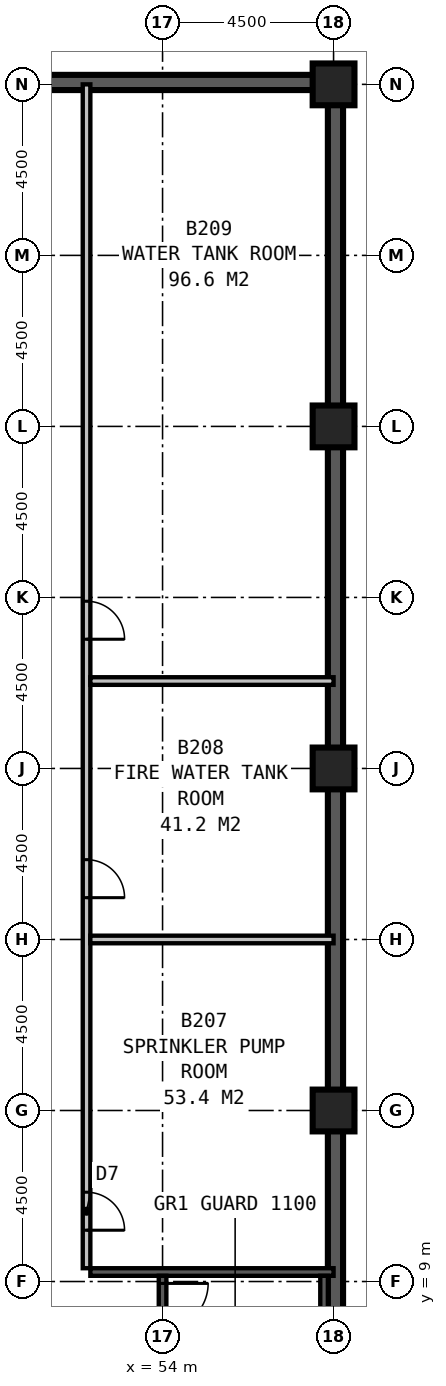
"""IFC4 building model, lengths in metres.
Left out: names, types, materials, properties, quantities, classifications, styles, units other than length and angle.
Written with IfcOpenShell. Run it as: python <this file> out.ifc"""

import sys

from ifc_helpers import new_model, si_unit, direction, frame, frame_2d, origin, origin_2d, place, context, subcontext, project, spatial, rectangle, extrude, element, fill, save


model = new_model("IFC4")
c1 = context("Model", 3, precision=1e-05, world=origin(), true_north=direction((0.0, 1.0)))
c2 = subcontext(c1, "Body", "Model", "MODEL_VIEW")
j1 = project(units=[si_unit("LENGTHUNIT", "METRE"), si_unit("PLANEANGLEUNIT", "RADIAN")], contexts=[c1])
p1 = place(None, origin())
s1 = spatial("IfcSite", under=j1, at=p1, CompositionType="ELEMENT")
p2 = place(p1, origin())
s2 = spatial("IfcBuilding", under=s1, at=p2, CompositionType="ELEMENT")
p3 = place(p2, frame((0.0, 0.0, -9.0)))
s3 = spatial("IfcBuildingStorey", under=s2, at=p3, CompositionType="ELEMENT", Elevation=-9.0)
for number, where, z_axis, x_axis in (
    (1, (58.5, 13.5, -0.6), (0.0, 0.0, 1.0), (1.0, 0.0, 0.0)),
    (2, (58.5, 22.5, -0.6), (0.0, 0.0, 1.0), (1.0, 0.0, 0.0)),
    (3, (58.5, 31.5, -0.6), (0.0, 0.0, 1.0), (1.0, 0.0, 0.0)),
    (4, (58.5, 40.5, -0.6), (0.0, 0.0, 1.0), (1.0, 0.0, 0.0)),
):
    element("IfcColumn", number, at=place(p3, frame(where, z_axis=z_axis, x_axis=x_axis)), inside=s3, PredefinedType="COLUMN", context=c2, shape_type="SweptSolid", body=[
        extrude(rectangle(XDim=1.1, YDim=1.1, at=origin_2d()), origin(), (0.0, 0.0, 1.0), 5.1),
    ])
p4 = place(p3, frame((58.55, -13.35, -0.6), z_axis=(0.0, 0.0, 1.0), x_axis=(0.0, 1.0, 0.0)))
e5 = element("IfcWall", 5, at=p4, inside=s3, PredefinedType="SOLIDWALL", context=c2, shape_type="SweptSolid", body=[
    extrude(rectangle(XDim=53.7, YDim=0.4, at=frame_2d((26.85, 0.0))), origin(), (0.0, 0.0, 1.0), 5.1),
])
p5 = place(p3, frame((58.75, 40.55, -0.6), z_axis=(0.0, 0.0, 1.0), x_axis=(-1.0, 0.0, 0.0)))
e6 = element("IfcWall", 6, at=p5, inside=s3, PredefinedType="SOLIDWALL", context=c2, shape_type="SweptSolid", body=[
    extrude(rectangle(XDim=77.0, YDim=0.4, at=frame_2d((38.5, 0.0))), origin(), (0.0, 0.0, 1.0), 5.1),
])
p6 = place(p3, frame((54.0, 1.1, 0.0), z_axis=(0.0, 0.0, 1.0), x_axis=(0.0, 1.0, 0.0)))
e7 = element("IfcWall", 7, at=p6, inside=s3, PredefinedType="SOLIDWALL", context=c2, shape_type="SweptSolid", body=[
    extrude(rectangle(XDim=8.05, YDim=0.2, at=frame_2d((4.025, 0.0))), origin(), (0.0, 0.0, 1.0), 4.25),
])
p7 = place(p6, frame((7.85, 0.0, 0.0), z_axis=(0.0, 0.0, 1.0), x_axis=(-1.0, 0.0, 0.0)))
e8 = element("IfcOpeningElement", 8, at=p7, cuts=e7, PredefinedType="OPENING", context=c2, shape_type="SweptSolid", body=[
    extrude(rectangle(XDim=1.2, YDim=2.1, at=frame_2d((0.6, 1.05))), frame((0.0, 0.11, 0.0), z_axis=(0.0, -1.0, 0.0), x_axis=(1.0, 0.0, 0.0)), (0.0, 0.0, 1.0), 0.22),
])
p8 = place(p3, frame((52.1, 9.25, 0.0), z_axis=(0.0, 0.0, 1.0), x_axis=(1.0, 0.0, 0.0)))
e9 = element("IfcWall", 9, at=p8, inside=s3, PredefinedType="SOLIDWALL", context=c2, shape_type="SweptSolid", body=[
    extrude(rectangle(XDim=6.4, YDim=0.2, at=frame_2d((3.2, 0.0))), origin(), (0.0, 0.0, 1.0), 4.25),
])
p9 = place(p3, frame((58.25, 5.05, 0.0), z_axis=(0.0, 0.0, 1.0), x_axis=(0.0, 1.0, 0.0)))
e10 = element("IfcWall", 10, at=p9, inside=s3, PredefinedType="SOLIDWALL", context=c2, shape_type="SweptSolid", body=[
    extrude(rectangle(XDim=4.1, YDim=0.2, at=frame_2d((2.05, 0.0))), origin(), (0.0, 0.0, 1.0), 4.25),
])
p10 = place(p3, frame((52.0, 9.35, 0.0), z_axis=(0.0, 0.0, 1.0), x_axis=(0.0, 1.0, 0.0)))
e11 = element("IfcWall", 11, at=p10, inside=s3, PredefinedType="PARTITIONING", context=c2, shape_type="SweptSolid", body=[
    extrude(rectangle(XDim=31.15, YDim=0.2, at=frame_2d((15.575, 0.0))), origin(), (0.0, 0.0, 1.0), 4.25),
])
p11 = place(p10, frame((2.0, 0.0, 0.0), z_axis=(0.0, 0.0, 1.0), x_axis=(-1.0, 0.0, 0.0)))
e12 = element("IfcOpeningElement", 12, at=p11, cuts=e11, PredefinedType="OPENING", context=c2, shape_type="SweptSolid", body=[
    extrude(rectangle(XDim=1.0, YDim=2.1, at=frame_2d((0.5, 1.05))), frame((0.0, 0.11, 0.0), z_axis=(0.0, -1.0, 0.0), x_axis=(1.0, 0.0, 0.0)), (0.0, 0.0, 1.0), 0.22),
])
p12 = place(p10, frame((10.75, 0.0, 0.0), z_axis=(0.0, 0.0, 1.0), x_axis=(-1.0, 0.0, 0.0)))
e13 = element("IfcOpeningElement", 13, at=p12, cuts=e11, PredefinedType="OPENING", context=c2, shape_type="SweptSolid", body=[
    extrude(rectangle(XDim=1.0, YDim=2.1, at=frame_2d((0.5, 1.05))), frame((0.0, 0.11, 0.0), z_axis=(0.0, -1.0, 0.0), x_axis=(1.0, 0.0, 0.0)), (0.0, 0.0, 1.0), 0.22),
])
p13 = place(p10, frame((17.55, 0.0, 0.0), z_axis=(0.0, 0.0, 1.0), x_axis=(-1.0, 0.0, 0.0)))
e14 = element("IfcOpeningElement", 14, at=p13, cuts=e11, PredefinedType="OPENING", context=c2, shape_type="SweptSolid", body=[
    extrude(rectangle(XDim=1.0, YDim=2.1, at=frame_2d((0.5, 1.05))), frame((0.0, 0.11, 0.0), z_axis=(0.0, -1.0, 0.0), x_axis=(1.0, 0.0, 0.0)), (0.0, 0.0, 1.0), 0.22),
])
for number, where, z_axis, x_axis in (
    (15, (52.1, 18.0, 0.0), (0.0, 0.0, 1.0), (1.0, 0.0, 0.0)),
    (16, (52.1, 24.8, 0.0), (0.0, 0.0, 1.0), (1.0, 0.0, 0.0)),
):
    element("IfcWall", number, at=place(p3, frame(where, z_axis=z_axis, x_axis=x_axis)), inside=s3, PredefinedType="PARTITIONING", context=c2, shape_type="SweptSolid", body=[
        extrude(rectangle(XDim=6.4, YDim=0.2, at=frame_2d((3.2, 0.0))), origin(), (0.0, 0.0, 1.0), 4.25),
    ])
p14 = place(p7, origin())
e17 = element("IfcDoor", 17, at=p14, inside=s3, OperationType="SINGLE_SWING_LEFT", PredefinedType="DOOR", context=c2, shape_type="SweptSolid", body=[
    extrude(rectangle(XDim=1.2, YDim=2.1, at=frame_2d((0.6, 1.05))), frame((0.0, 0.025, 0.0), z_axis=(0.0, -1.0, 0.0), x_axis=(1.0, 0.0, 0.0)), (0.0, 0.0, 1.0), 0.05),
])
fill(e8, e17)
p15 = place(p11, origin())
e18 = element("IfcDoor", 18, at=p15, inside=s3, OperationType="SINGLE_SWING_RIGHT", PredefinedType="DOOR", context=c2, shape_type="SweptSolid", body=[
    extrude(rectangle(XDim=1.0, YDim=2.1, at=frame_2d((0.5, 1.05))), frame((0.0, 0.025, 0.0), z_axis=(0.0, -1.0, 0.0), x_axis=(1.0, 0.0, 0.0)), (0.0, 0.0, 1.0), 0.05),
])
fill(e12, e18)
p16 = place(p12, origin())
e19 = element("IfcDoor", 19, at=p16, inside=s3, OperationType="SINGLE_SWING_RIGHT", PredefinedType="DOOR", context=c2, shape_type="SweptSolid", body=[
    extrude(rectangle(XDim=1.0, YDim=2.1, at=frame_2d((0.5, 1.05))), frame((0.0, 0.025, 0.0), z_axis=(0.0, -1.0, 0.0), x_axis=(1.0, 0.0, 0.0)), (0.0, 0.0, 1.0), 0.05),
])
fill(e13, e19)
p17 = place(p13, origin())
e20 = element("IfcDoor", 20, at=p17, inside=s3, OperationType="SINGLE_SWING_RIGHT", PredefinedType="DOOR", context=c2, shape_type="SweptSolid", body=[
    extrude(rectangle(XDim=1.0, YDim=2.1, at=frame_2d((0.5, 1.05))), frame((0.0, 0.025, 0.0), z_axis=(0.0, -1.0, 0.0), x_axis=(1.0, 0.0, 0.0)), (0.0, 0.0, 1.0), 0.05),
])
fill(e14, e20)
save(model, sys.argv[1])
